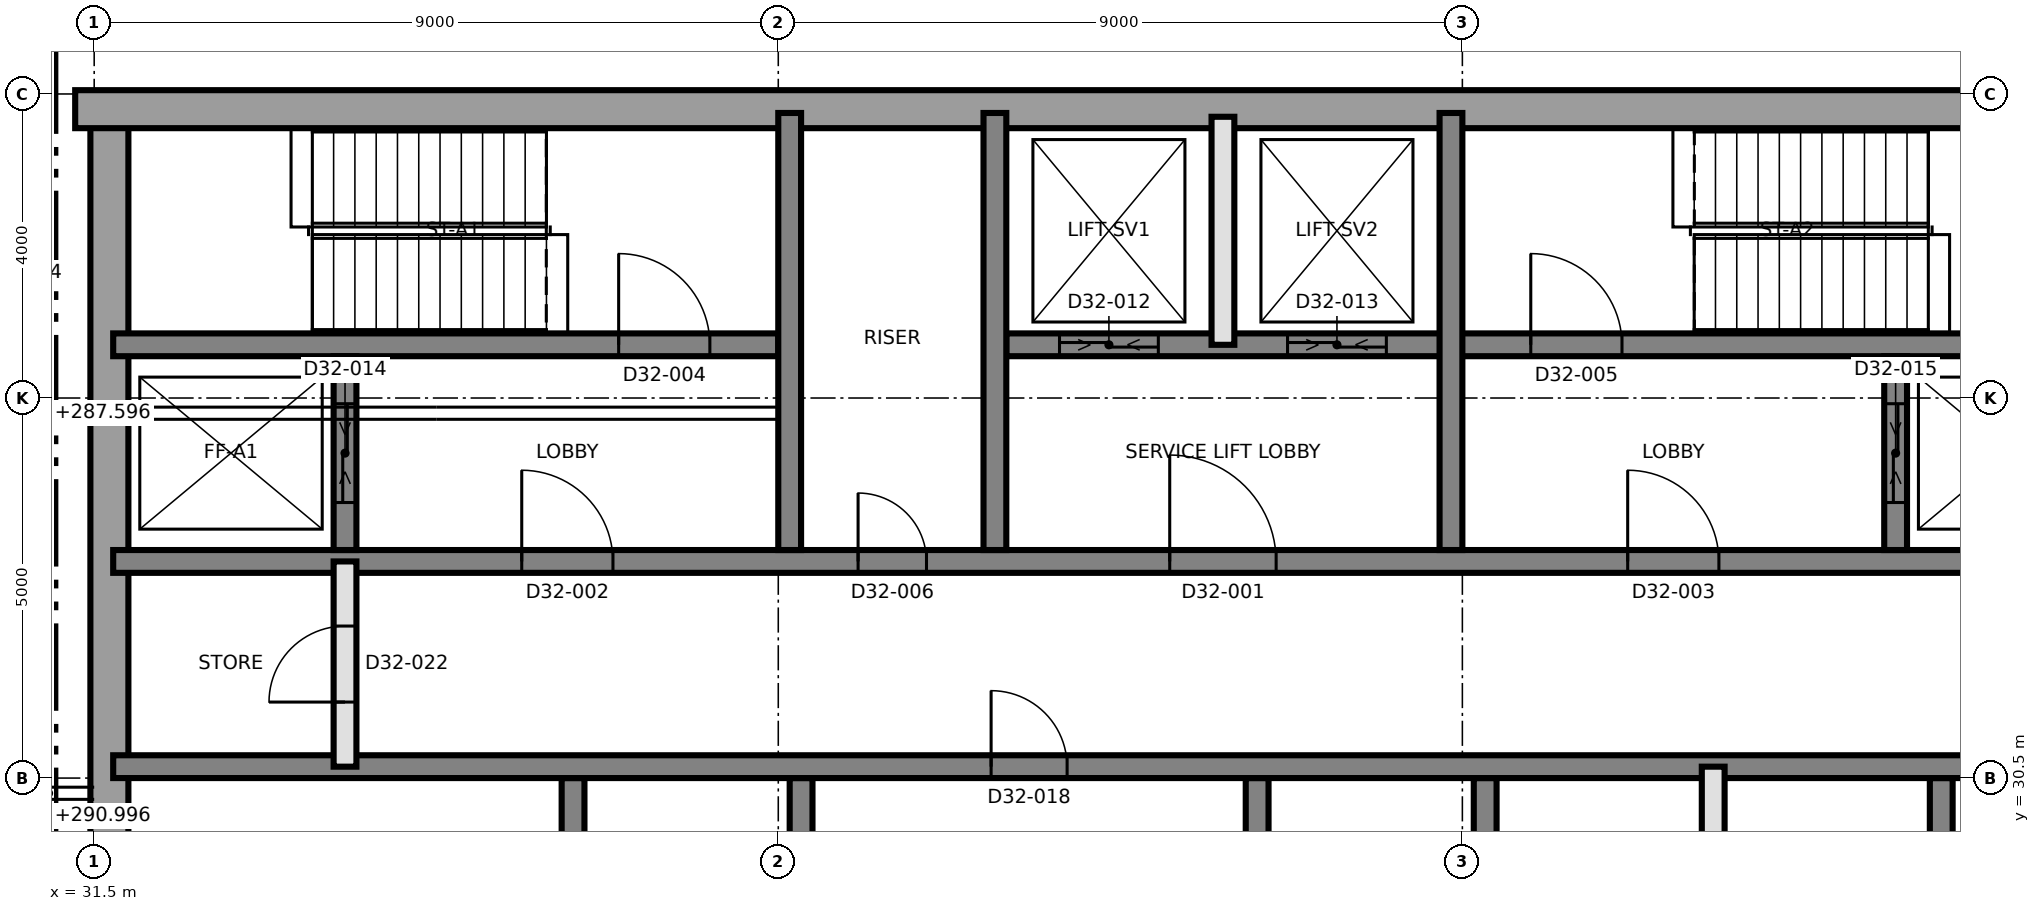
"""IFC4 building model, lengths in metres.
Left out: names, types, materials, properties, quantities, classifications, styles, units other than length and angle.
Written with IfcOpenShell. Run it as: python <this file> out.ifc"""

import sys

from ifc_helpers import new_model, si_unit, direction, frame, frame_2d, origin, place, context, subcontext, project, spatial, rectangle, extrude, element, fill, save


model = new_model("IFC4")
c1 = context("Model", 3, precision=1e-05, world=origin(), true_north=direction((0.0, 1.0)))
c2 = subcontext(c1, "Body", "Model", "MODEL_VIEW")
j1 = project(units=[si_unit("LENGTHUNIT", "METRE"), si_unit("PLANEANGLEUNIT", "RADIAN")], contexts=[c1])
p1 = place(None, origin())
s1 = spatial("IfcSite", under=j1, at=p1, CompositionType="ELEMENT")
p2 = place(p1, origin())
s2 = spatial("IfcBuilding", under=s1, at=p2, CompositionType="ELEMENT")
p3 = place(p2, frame((0.0, 0.0, 272.9)))
s3 = spatial("IfcBuildingStorey", under=s2, at=p3, CompositionType="ELEMENT", Elevation=272.9)
p4 = place(p3, frame((31.7, 21.75, 0.0), z_axis=(0.0, 0.0, 1.0), x_axis=(0.0, 1.0, 0.0)))
e1 = element("IfcWall", 1, at=p4, inside=s3, PredefinedType="SHEAR", context=c2, shape_type="SweptSolid", body=[
    extrude(rectangle(XDim=17.5, YDim=0.5, at=frame_2d((8.75, 0.0))), origin(), (0.0, 0.0, 1.0), 4.2),
])
p5 = place(p3, frame((31.25, 39.3, 0.0), z_axis=(0.0, 0.0, 1.0), x_axis=(1.0, 0.0, 0.0)))
e2 = element("IfcWall", 2, at=p5, inside=s3, PredefinedType="SHEAR", context=c2, shape_type="SweptSolid", body=[
    extrude(rectangle(XDim=27.0, YDim=0.5, at=frame_2d((13.5, 0.0))), origin(), (0.0, 0.0, 1.0), 4.2),
])
p6 = place(p3, frame((37.8, 21.75, 0.0), z_axis=(0.0, 0.0, 1.0), x_axis=(0.0, 1.0, 0.0)))
e3 = element("IfcWall", 3, at=p6, inside=s3, PredefinedType="SHEAR", context=c2, shape_type="SweptSolid", body=[
    extrude(rectangle(XDim=8.75, YDim=0.3, at=frame_2d((4.375, 0.0))), origin(), (0.0, 0.0, 1.0), 4.2),
])
p7 = place(p6, frame((6.675, 0.0, 0.0)))
e4 = element("IfcOpeningElement", 4, at=p7, cuts=e3, PredefinedType="OPENING", context=c2, shape_type="SweptSolid", body=[
    extrude(rectangle(XDim=1.0, YDim=2.1, at=frame_2d((0.5, 1.05))), frame((0.0, 0.16, 0.0), z_axis=(0.0, -1.0, 0.0), x_axis=(1.0, 0.0, 0.0)), (0.0, 0.0, 1.0), 0.32),
])
p8 = place(p6, frame((3.8, 0.0, 0.0)))
e5 = element("IfcOpeningElement", 5, at=p8, cuts=e3, PredefinedType="OPENING", context=c2, shape_type="SweptSolid", body=[
    extrude(rectangle(XDim=1.0, YDim=2.1, at=frame_2d((0.5, 1.05))), frame((0.0, 0.16, 0.0), z_axis=(0.0, -1.0, 0.0), x_axis=(1.0, 0.0, 0.0)), (0.0, 0.0, 1.0), 0.32),
])
for number, where, z_axis, x_axis in (
    (6, (40.8, 21.75, 0.0), (0.0, 0.0, 1.0), (0.0, 1.0, 0.0)),
    (7, (46.8, 21.75, 0.0), (0.0, 0.0, 1.0), (0.0, 1.0, 0.0)),
):
    element("IfcWall", number, at=place(p3, frame(where, z_axis=z_axis, x_axis=x_axis)), inside=s3, PredefinedType="SHEAR", context=c2, shape_type="SweptSolid", body=[
        extrude(rectangle(XDim=8.75, YDim=0.3, at=frame_2d((4.375, 0.0))), origin(), (0.0, 0.0, 1.0), 4.2),
    ])
p9 = place(p3, frame((49.8, 21.75, 0.0), z_axis=(0.0, 0.0, 1.0), x_axis=(0.0, 1.0, 0.0)))
e8 = element("IfcWall", 8, at=p9, inside=s3, PredefinedType="SHEAR", context=c2, shape_type="SweptSolid", body=[
    extrude(rectangle(XDim=8.75, YDim=0.3, at=frame_2d((4.375, 0.0))), origin(), (0.0, 0.0, 1.0), 4.2),
])
p10 = place(p9, frame((4.425, 0.0, 0.0)))
e9 = element("IfcOpeningElement", 9, at=p10, cuts=e8, PredefinedType="OPENING", context=c2, shape_type="SweptSolid", body=[
    extrude(rectangle(XDim=1.0, YDim=2.1, at=frame_2d((0.5, 1.05))), frame((0.0, 0.16, 0.0), z_axis=(0.0, -1.0, 0.0), x_axis=(1.0, 0.0, 0.0)), (0.0, 0.0, 1.0), 0.32),
])
p11 = place(p3, frame((55.8, 21.75, 0.0), z_axis=(0.0, 0.0, 1.0), x_axis=(0.0, 1.0, 0.0)))
e10 = element("IfcWall", 10, at=p11, inside=s3, PredefinedType="SHEAR", context=c2, shape_type="SweptSolid", body=[
    extrude(rectangle(XDim=8.75, YDim=0.3, at=frame_2d((4.375, 0.0))), origin(), (0.0, 0.0, 1.0), 4.2),
])
p12 = place(p3, frame((31.75, 30.65, 0.0), z_axis=(0.0, 0.0, 1.0), x_axis=(1.0, 0.0, 0.0)))
e11 = element("IfcWall", 11, at=p12, inside=s3, PredefinedType="SHEAR", context=c2, shape_type="SweptSolid", body=[
    extrude(rectangle(XDim=26.5, YDim=0.3, at=frame_2d((13.25, 0.0))), origin(), (0.0, 0.0, 1.0), 4.2),
])
p13 = place(p12, frame((24.75, 0.0, 0.0)))
e12 = element("IfcOpeningElement", 12, at=p13, cuts=e11, PredefinedType="OPENING", context=c2, shape_type="SweptSolid", body=[
    extrude(rectangle(XDim=1.0, YDim=2.1, at=frame_2d((0.5, 1.05))), frame((0.0, 0.16, 0.0), z_axis=(0.0, -1.0, 0.0), x_axis=(1.0, 0.0, 0.0)), (0.0, 0.0, 1.0), 0.32),
])
p14 = place(p12, frame((11.55, 0.0, 0.0)))
e13 = element("IfcOpeningElement", 13, at=p14, cuts=e11, PredefinedType="OPENING", context=c2, shape_type="SweptSolid", body=[
    extrude(rectangle(XDim=1.0, YDim=2.1, at=frame_2d((0.5, 1.05))), frame((0.0, 0.16, 0.0), z_axis=(0.0, -1.0, 0.0), x_axis=(1.0, 0.0, 0.0)), (0.0, 0.0, 1.0), 0.32),
])
p15 = place(p3, frame((31.75, 33.35, 0.0), z_axis=(0.0, 0.0, 1.0), x_axis=(1.0, 0.0, 0.0)))
e14 = element("IfcWall", 14, at=p15, inside=s3, PredefinedType="SHEAR", context=c2, shape_type="SweptSolid", body=[
    extrude(rectangle(XDim=26.5, YDim=0.3, at=frame_2d((13.25, 0.0))), origin(), (0.0, 0.0, 1.0), 4.2),
])
p16 = place(p15, frame((13.9, 0.0, 0.0)))
e15 = element("IfcOpeningElement", 15, at=p16, cuts=e14, PredefinedType="OPENING", context=c2, shape_type="SweptSolid", body=[
    extrude(rectangle(XDim=1.4, YDim=2.1, at=frame_2d((0.7, 1.05))), frame((0.0, 0.16, 0.0), z_axis=(0.0, -1.0, 0.0), x_axis=(1.0, 0.0, 0.0)), (0.0, 0.0, 1.0), 0.32),
])
p17 = place(p15, frame((5.375, 0.0, 0.0)))
e16 = element("IfcOpeningElement", 16, at=p17, cuts=e14, PredefinedType="OPENING", context=c2, shape_type="SweptSolid", body=[
    extrude(rectangle(XDim=1.2, YDim=2.1, at=frame_2d((0.6, 1.05))), frame((0.0, 0.16, 0.0), z_axis=(0.0, -1.0, 0.0), x_axis=(1.0, 0.0, 0.0)), (0.0, 0.0, 1.0), 0.32),
])
p18 = place(p15, frame((19.925, 0.0, 0.0)))
e17 = element("IfcOpeningElement", 17, at=p18, cuts=e14, PredefinedType="OPENING", context=c2, shape_type="SweptSolid", body=[
    extrude(rectangle(XDim=1.2, YDim=2.1, at=frame_2d((0.6, 1.05))), frame((0.0, 0.16, 0.0), z_axis=(0.0, -1.0, 0.0), x_axis=(1.0, 0.0, 0.0)), (0.0, 0.0, 1.0), 0.32),
])
p19 = place(p15, frame((9.8, 0.0, 0.0)))
e18 = element("IfcOpeningElement", 18, at=p19, cuts=e14, PredefinedType="OPENING", context=c2, shape_type="SweptSolid", body=[
    extrude(rectangle(XDim=0.9, YDim=2.1, at=frame_2d((0.45, 1.05))), frame((0.0, 0.16, 0.0), z_axis=(0.0, -1.0, 0.0), x_axis=(1.0, 0.0, 0.0)), (0.0, 0.0, 1.0), 0.32),
])
p20 = place(p3, frame((31.75, 36.2, 0.0), z_axis=(0.0, 0.0, 1.0), x_axis=(1.0, 0.0, 0.0)))
e19 = element("IfcWall", 19, at=p20, inside=s3, PredefinedType="SHEAR", context=c2, shape_type="SweptSolid", body=[
    extrude(rectangle(XDim=8.75, YDim=0.3, at=frame_2d((4.375, 0.0))), origin(), (0.0, 0.0, 1.0), 4.2),
])
p21 = place(p20, frame((6.65, 0.0, 0.0)))
e20 = element("IfcOpeningElement", 20, at=p21, cuts=e19, PredefinedType="OPENING", context=c2, shape_type="SweptSolid", body=[
    extrude(rectangle(XDim=1.2, YDim=2.1, at=frame_2d((0.6, 1.05))), frame((0.0, 0.16, 0.0), z_axis=(0.0, -1.0, 0.0), x_axis=(1.0, 0.0, 0.0)), (0.0, 0.0, 1.0), 0.32),
])
p22 = place(p3, frame((43.5, 36.2, 0.0), z_axis=(0.0, 0.0, 1.0), x_axis=(1.0, 0.0, 0.0)))
e21 = element("IfcWall", 21, at=p22, inside=s3, PredefinedType="SHEAR", context=c2, shape_type="SweptSolid", body=[
    extrude(rectangle(XDim=14.75, YDim=0.3, at=frame_2d((7.375, 0.0))), origin(), (0.0, 0.0, 1.0), 4.2),
])
p23 = place(p22, frame((6.9, 0.0, 0.0)))
e22 = element("IfcOpeningElement", 22, at=p23, cuts=e21, PredefinedType="OPENING", context=c2, shape_type="SweptSolid", body=[
    extrude(rectangle(XDim=1.2, YDim=2.1, at=frame_2d((0.6, 1.05))), frame((0.0, 0.16, 0.0), z_axis=(0.0, -1.0, 0.0), x_axis=(1.0, 0.0, 0.0)), (0.0, 0.0, 1.0), 0.32),
])
p24 = place(p22, frame((0.7, 0.0, 0.0)))
e23 = element("IfcOpeningElement", 23, at=p24, cuts=e21, PredefinedType="OPENING", context=c2, shape_type="SweptSolid", body=[
    extrude(rectangle(XDim=1.3, YDim=2.4, at=frame_2d((0.65, 1.2))), frame((0.0, 0.16, 0.0), z_axis=(0.0, -1.0, 0.0), x_axis=(1.0, 0.0, 0.0)), (0.0, 0.0, 1.0), 0.32),
])
p25 = place(p22, frame((3.7, 0.0, 0.0)))
e24 = element("IfcOpeningElement", 24, at=p25, cuts=e21, PredefinedType="OPENING", context=c2, shape_type="SweptSolid", body=[
    extrude(rectangle(XDim=1.3, YDim=2.4, at=frame_2d((0.65, 1.2))), frame((0.0, 0.16, 0.0), z_axis=(0.0, -1.0, 0.0), x_axis=(1.0, 0.0, 0.0)), (0.0, 0.0, 1.0), 0.32),
])
for number, where, z_axis, x_axis in (
    (25, (40.65, 33.5, 0.0), (0.0, 0.0, 1.0), (0.0, 1.0, 0.0)),
    (26, (43.35, 33.5, 0.0), (0.0, 0.0, 1.0), (0.0, 1.0, 0.0)),
):
    element("IfcWall", number, at=place(p3, frame(where, z_axis=z_axis, x_axis=x_axis)), inside=s3, PredefinedType="SHEAR", context=c2, shape_type="SweptSolid", body=[
        extrude(rectangle(XDim=5.75, YDim=0.3, at=frame_2d((2.875, 0.0))), origin(), (0.0, 0.0, 1.0), 4.2),
    ])
p26 = place(p3, frame((34.8, 33.5, 0.0), z_axis=(0.0, 0.0, 1.0), x_axis=(0.0, 1.0, 0.0)))
e27 = element("IfcWall", 27, at=p26, inside=s3, PredefinedType="SHEAR", context=c2, shape_type="SweptSolid", body=[
    extrude(rectangle(XDim=2.55, YDim=0.3, at=frame_2d((1.275, 0.0))), origin(), (0.0, 0.0, 1.0), 4.2),
])
p27 = place(p26, frame((0.625, 0.0, 0.0)))
e28 = element("IfcOpeningElement", 28, at=p27, cuts=e27, PredefinedType="OPENING", context=c2, shape_type="SweptSolid", body=[
    extrude(rectangle(XDim=1.3, YDim=2.4, at=frame_2d((0.65, 1.2))), frame((0.0, 0.16, 0.0), z_axis=(0.0, -1.0, 0.0), x_axis=(1.0, 0.0, 0.0)), (0.0, 0.0, 1.0), 0.32),
])
p28 = place(p3, frame((49.35, 33.5, 0.0), z_axis=(0.0, 0.0, 1.0), x_axis=(0.0, 1.0, 0.0)))
e29 = element("IfcWall", 29, at=p28, inside=s3, PredefinedType="SHEAR", context=c2, shape_type="SweptSolid", body=[
    extrude(rectangle(XDim=5.75, YDim=0.3, at=frame_2d((2.875, 0.0))), origin(), (0.0, 0.0, 1.0), 4.2),
])
p29 = place(p3, frame((55.2, 33.5, 0.0), z_axis=(0.0, 0.0, 1.0), x_axis=(0.0, 1.0, 0.0)))
e30 = element("IfcWall", 30, at=p29, inside=s3, PredefinedType="SHEAR", context=c2, shape_type="SweptSolid", body=[
    extrude(rectangle(XDim=2.55, YDim=0.3, at=frame_2d((1.275, 0.0))), origin(), (0.0, 0.0, 1.0), 4.2),
])
p30 = place(p29, frame((0.625, 0.0, 0.0)))
e31 = element("IfcOpeningElement", 31, at=p30, cuts=e30, PredefinedType="OPENING", context=c2, shape_type="SweptSolid", body=[
    extrude(rectangle(XDim=1.3, YDim=2.4, at=frame_2d((0.65, 1.2))), frame((0.0, 0.16, 0.0), z_axis=(0.0, -1.0, 0.0), x_axis=(1.0, 0.0, 0.0)), (0.0, 0.0, 1.0), 0.32),
])
p31 = place(p3, frame((34.8, 30.65, 0.0), z_axis=(0.0, 0.0, 1.0), x_axis=(0.0, 1.0, 0.0)))
e32 = element("IfcWall", 32, at=p31, inside=s3, PredefinedType="SOLIDWALL", context=c2, shape_type="SweptSolid", body=[
    extrude(rectangle(XDim=2.7, YDim=0.3, at=frame_2d((1.35, 0.0))), origin(), (0.0, 0.0, 1.0), 3.9),
])
p32 = place(p31, frame((0.85, 0.0, 0.0)))
e33 = element("IfcOpeningElement", 33, at=p32, cuts=e32, PredefinedType="OPENING", context=c2, shape_type="SweptSolid", body=[
    extrude(rectangle(XDim=1.0, YDim=2.1, at=frame_2d((0.5, 1.05))), frame((0.0, 0.16, 0.0), z_axis=(0.0, -1.0, 0.0), x_axis=(1.0, 0.0, 0.0)), (0.0, 0.0, 1.0), 0.32),
])
p33 = place(p3, frame((46.35, 36.2, 0.0), z_axis=(0.0, 0.0, 1.0), x_axis=(0.0, 1.0, 0.0)))
e34 = element("IfcWall", 34, at=p33, inside=s3, PredefinedType="SOLIDWALL", context=c2, shape_type="SweptSolid", body=[
    extrude(rectangle(XDim=3.0, YDim=0.3, at=frame_2d((1.5, 0.0))), origin(), (0.0, 0.0, 1.0), 3.9),
])
p34 = place(p3, frame((52.8, 27.9, 0.0), z_axis=(0.0, 0.0, 1.0), x_axis=(0.0, 1.0, 0.0)))
e35 = element("IfcWall", 35, at=p34, inside=s3, PredefinedType="SOLIDWALL", context=c2, shape_type="SweptSolid", body=[
    extrude(rectangle(XDim=2.75, YDim=0.3, at=frame_2d((1.375, 0.0))), origin(), (0.0, 0.0, 1.0), 3.9),
])
p35 = place(p16, origin())
e36 = element("IfcDoor", 36, at=p35, inside=s3, OperationType="SINGLE_SWING_RIGHT", PredefinedType="DOOR", context=c2, shape_type="SweptSolid", body=[
    extrude(rectangle(XDim=1.4, YDim=2.1, at=frame_2d((0.7, 1.05))), frame((0.0, 0.025, 0.0), z_axis=(0.0, -1.0, 0.0), x_axis=(1.0, 0.0, 0.0)), (0.0, 0.0, 1.0), 0.05),
])
fill(e15, e36)
p36 = place(p17, origin())
e37 = element("IfcDoor", 37, at=p36, inside=s3, OperationType="SINGLE_SWING_LEFT", PredefinedType="DOOR", context=c2, shape_type="SweptSolid", body=[
    extrude(rectangle(XDim=1.2, YDim=2.1, at=frame_2d((0.6, 1.05))), frame((0.0, 0.025, 0.0), z_axis=(0.0, -1.0, 0.0), x_axis=(1.0, 0.0, 0.0)), (0.0, 0.0, 1.0), 0.05),
])
fill(e16, e37)
p37 = place(p18, origin())
e38 = element("IfcDoor", 38, at=p37, inside=s3, OperationType="SINGLE_SWING_RIGHT", PredefinedType="DOOR", context=c2, shape_type="SweptSolid", body=[
    extrude(rectangle(XDim=1.2, YDim=2.1, at=frame_2d((0.6, 1.05))), frame((0.0, 0.025, 0.0), z_axis=(0.0, -1.0, 0.0), x_axis=(1.0, 0.0, 0.0)), (0.0, 0.0, 1.0), 0.05),
])
fill(e17, e38)
p38 = place(p21, origin())
e39 = element("IfcDoor", 39, at=p38, inside=s3, OperationType="SINGLE_SWING_RIGHT", PredefinedType="DOOR", context=c2, shape_type="SweptSolid", body=[
    extrude(rectangle(XDim=1.2, YDim=2.1, at=frame_2d((0.6, 1.05))), frame((0.0, 0.025, 0.0), z_axis=(0.0, -1.0, 0.0), x_axis=(1.0, 0.0, 0.0)), (0.0, 0.0, 1.0), 0.05),
])
fill(e20, e39)
p39 = place(p23, origin())
e40 = element("IfcDoor", 40, at=p39, inside=s3, OperationType="SINGLE_SWING_LEFT", PredefinedType="DOOR", context=c2, shape_type="SweptSolid", body=[
    extrude(rectangle(XDim=1.2, YDim=2.1, at=frame_2d((0.6, 1.05))), frame((0.0, 0.025, 0.0), z_axis=(0.0, -1.0, 0.0), x_axis=(1.0, 0.0, 0.0)), (0.0, 0.0, 1.0), 0.05),
])
fill(e22, e40)
p40 = place(p19, origin())
e41 = element("IfcDoor", 41, at=p40, inside=s3, OperationType="SINGLE_SWING_LEFT", PredefinedType="DOOR", context=c2, shape_type="SweptSolid", body=[
    extrude(rectangle(XDim=0.9, YDim=2.1, at=frame_2d((0.45, 1.05))), frame((0.0, 0.025, 0.0), z_axis=(0.0, -1.0, 0.0), x_axis=(1.0, 0.0, 0.0)), (0.0, 0.0, 1.0), 0.05),
])
fill(e18, e41)
p41 = place(p24, origin())
e42 = element("IfcDoor", 42, at=p41, inside=s3, OperationType="SLIDING_TO_LEFT", PredefinedType="DOOR", context=c2, shape_type="SweptSolid", body=[
    extrude(rectangle(XDim=1.3, YDim=2.4, at=frame_2d((0.65, 1.2))), frame((0.0, 0.025, 0.0), z_axis=(0.0, -1.0, 0.0), x_axis=(1.0, 0.0, 0.0)), (0.0, 0.0, 1.0), 0.05),
])
fill(e23, e42)
p42 = place(p25, origin())
e43 = element("IfcDoor", 43, at=p42, inside=s3, OperationType="SLIDING_TO_LEFT", PredefinedType="DOOR", context=c2, shape_type="SweptSolid", body=[
    extrude(rectangle(XDim=1.3, YDim=2.4, at=frame_2d((0.65, 1.2))), frame((0.0, 0.025, 0.0), z_axis=(0.0, -1.0, 0.0), x_axis=(1.0, 0.0, 0.0)), (0.0, 0.0, 1.0), 0.05),
])
fill(e24, e43)
p43 = place(p27, origin())
e44 = element("IfcDoor", 44, at=p43, inside=s3, OperationType="SLIDING_TO_LEFT", PredefinedType="DOOR", context=c2, shape_type="SweptSolid", body=[
    extrude(rectangle(XDim=1.3, YDim=2.4, at=frame_2d((0.65, 1.2))), frame((0.0, 0.025, 0.0), z_axis=(0.0, -1.0, 0.0), x_axis=(1.0, 0.0, 0.0)), (0.0, 0.0, 1.0), 0.05),
])
fill(e28, e44)
p44 = place(p30, origin())
e45 = element("IfcDoor", 45, at=p44, inside=s3, OperationType="SLIDING_TO_LEFT", PredefinedType="DOOR", context=c2, shape_type="SweptSolid", body=[
    extrude(rectangle(XDim=1.3, YDim=2.4, at=frame_2d((0.65, 1.2))), frame((0.0, 0.025, 0.0), z_axis=(0.0, -1.0, 0.0), x_axis=(1.0, 0.0, 0.0)), (0.0, 0.0, 1.0), 0.05),
])
fill(e31, e45)
p45 = place(p14, origin())
e46 = element("IfcDoor", 46, at=p45, inside=s3, OperationType="SINGLE_SWING_LEFT", PredefinedType="DOOR", context=c2, shape_type="SweptSolid", body=[
    extrude(rectangle(XDim=1.0, YDim=2.1, at=frame_2d((0.5, 1.05))), frame((0.0, 0.025, 0.0), z_axis=(0.0, -1.0, 0.0), x_axis=(1.0, 0.0, 0.0)), (0.0, 0.0, 1.0), 0.05),
])
fill(e13, e46)
p46 = place(p32, origin())
e47 = element("IfcDoor", 47, at=p46, inside=s3, OperationType="SINGLE_SWING_LEFT", PredefinedType="DOOR", context=c2, shape_type="SweptSolid", body=[
    extrude(rectangle(XDim=1.0, YDim=2.1, at=frame_2d((0.5, 1.05))), frame((0.0, 0.025, 0.0), z_axis=(0.0, -1.0, 0.0), x_axis=(1.0, 0.0, 0.0)), (0.0, 0.0, 1.0), 0.05),
])
fill(e33, e47)
save(model, sys.argv[1])
